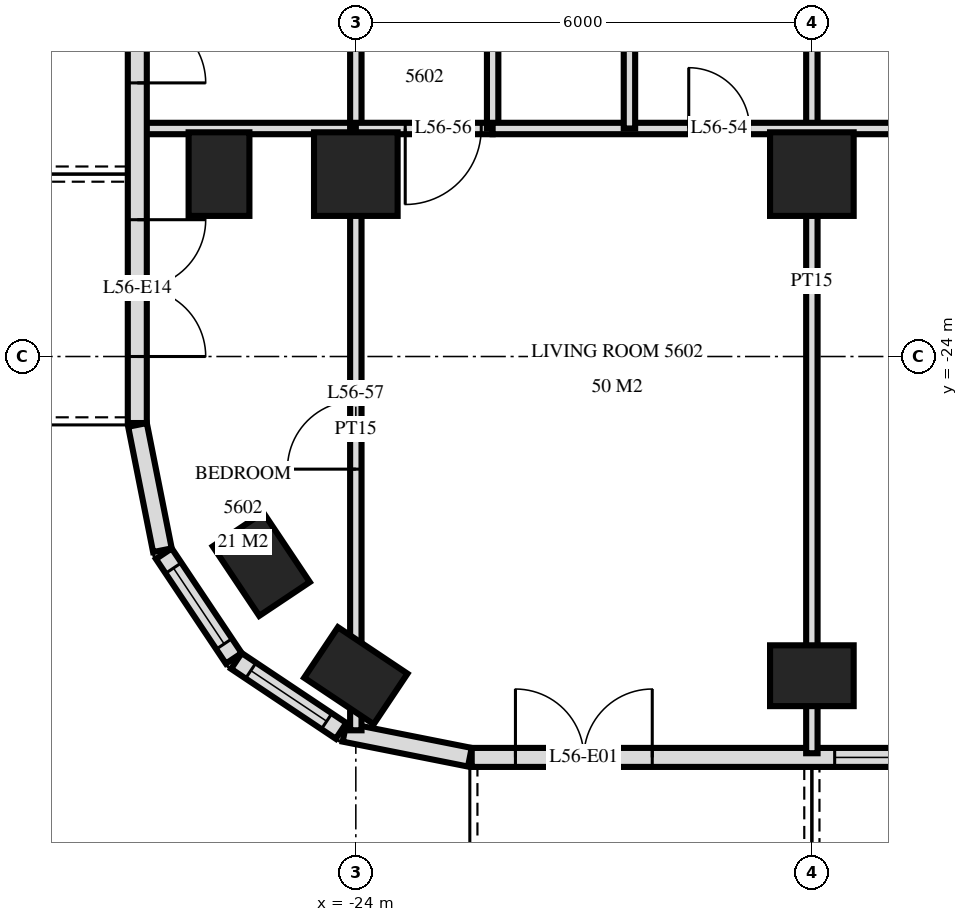
"""IFC4 building model, lengths in metres.
Left out: names, types, materials, properties, quantities, classifications, styles, units other than length and angle.
Written with IfcOpenShell. Run it as: python <this file> out.ifc"""

import sys

from ifc_helpers import new_model, si_unit, direction, frame, frame_2d, origin, origin_2d, place, context, subcontext, project, spatial, rectangle, extrude, element, fill, save


model = new_model("IFC4")
c1 = context("Model", 3, precision=1e-05, world=origin(), true_north=direction((0.0, 1.0)))
c2 = subcontext(c1, "Body", "Model", "MODEL_VIEW")
j1 = project(units=[si_unit("LENGTHUNIT", "METRE"), si_unit("PLANEANGLEUNIT", "RADIAN")], contexts=[c1])
p1 = place(None, origin())
s1 = spatial("IfcSite", under=j1, at=p1, CompositionType="ELEMENT")
p2 = place(p1, origin())
s2 = spatial("IfcBuilding", under=s1, at=p2, CompositionType="ELEMENT")
p3 = place(p2, frame((0.0, 0.0, 215.1)))
s3 = spatial("IfcBuildingStorey", under=s2, at=p3, CompositionType="ELEMENT", Elevation=215.1)
for number, where, z_axis, x_axis in (
    (1, (-25.8, -21.6, 0.0), (0.0, 0.0, 1.0), (0.0, 1.0, 0.0)),
    (2, (-25.244, -26.733, 0.0), (0.0, 0.0, 1.0), (-0.556, 0.831, 0.0)),
    (3, (-24.0, -28.2, 0.0), (0.0, 0.0, 1.0), (-0.831, 0.556, 0.0)),
):
    element("IfcColumn", number, at=place(p3, frame(where, z_axis=z_axis, x_axis=x_axis)), inside=s3, PredefinedType="COLUMN", context=c2, shape_type="SweptSolid", body=[
        extrude(rectangle(XDim=1.1, YDim=0.8, at=origin_2d()), origin(), (0.0, 0.0, 1.0), 3.5),
    ])
p4 = place(p3, frame((-24.0, -21.6, 0.0), z_axis=(0.0, 0.0, 1.0), x_axis=(1.0, 0.0, 0.0)))
e4 = element("IfcColumn", 4, at=p4, inside=s3, PredefinedType="COLUMN", context=c2, shape_type="SweptSolid", body=[
    extrude(rectangle(XDim=1.1, YDim=1.1, at=origin_2d()), origin(), (0.0, 0.0, 1.0), 3.5),
])
p5 = place(p3, frame((-18.0, -28.2, 0.0), z_axis=(0.0, 0.0, 1.0), x_axis=(1.0, 0.0, 0.0)))
e5 = element("IfcColumn", 5, at=p5, inside=s3, PredefinedType="COLUMN", context=c2, shape_type="SweptSolid", body=[
    extrude(rectangle(XDim=1.1, YDim=0.8, at=origin_2d()), origin(), (0.0, 0.0, 1.0), 3.5),
])
p6 = place(p3, frame((-18.0, -21.6, 0.0), z_axis=(0.0, 0.0, 1.0), x_axis=(1.0, 0.0, 0.0)))
e6 = element("IfcColumn", 6, at=p6, inside=s3, PredefinedType="COLUMN", context=c2, shape_type="SweptSolid", body=[
    extrude(rectangle(XDim=1.1, YDim=1.1, at=origin_2d()), origin(), (0.0, 0.0, 1.0), 3.5),
])
p7 = place(p3, frame((-26.875, -3.325, 0.0), z_axis=(0.0, 0.0, 1.0), x_axis=(0.0, -1.0, 0.0)))
e7 = element("IfcWall", 7, at=p7, inside=s3, PredefinedType="SOLIDWALL", context=c2, shape_type="SweptSolid", body=[
    extrude(rectangle(XDim=21.551, YDim=0.25, at=frame_2d((10.775, 0.0))), origin(), (0.0, 0.0, 1.0), 3.22),
])
p8 = place(p7, frame((7.275, 0.0, 0.0)))
e8 = element("IfcOpeningElement", 8, at=p8, cuts=e7, PredefinedType="OPENING", context=c2, shape_type="SweptSolid", body=[
    extrude(rectangle(XDim=1.8, YDim=2.4, at=frame_2d((0.9, 1.2))), frame((0.0, 0.135, 0.0), z_axis=(0.0, -1.0, 0.0), x_axis=(1.0, 0.0, 0.0)), (0.0, 0.0, 1.0), 0.27),
])
p9 = place(p7, frame((15.275, 0.0, 0.0)))
e9 = element("IfcOpeningElement", 9, at=p9, cuts=e7, PredefinedType="OPENING", context=c2, shape_type="SweptSolid", body=[
    extrude(rectangle(XDim=1.8, YDim=2.4, at=frame_2d((0.9, 1.2))), frame((0.0, 0.135, 0.0), z_axis=(0.0, -1.0, 0.0), x_axis=(1.0, 0.0, 0.0)), (0.0, 0.0, 1.0), 0.27),
])
p10 = place(p7, frame((18.875, 0.0, 0.0)))
e10 = element("IfcOpeningElement", 10, at=p10, cuts=e7, PredefinedType="OPENING", context=c2, shape_type="SweptSolid", body=[
    extrude(rectangle(XDim=1.8, YDim=2.4, at=frame_2d((0.9, 1.2))), frame((0.0, 0.135, 0.0), z_axis=(0.0, -1.0, 0.0), x_axis=(1.0, 0.0, 0.0)), (0.0, 0.0, 1.0), 0.27),
])
p11 = place(p3, frame((-26.873, -24.9, 0.0), z_axis=(0.0, 0.0, 1.0), x_axis=(0.195026884138, -0.980797896849, 0.0)))
e11 = element("IfcWall", 11, at=p11, inside=s3, PredefinedType="SOLIDWALL", context=c2, shape_type="SweptSolid", body=[
    extrude(rectangle(XDim=1.681, YDim=0.25, at=frame_2d((0.841, 0.0))), origin(), (0.0, 0.0, 1.0), 3.22),
])
p12 = place(p3, frame((-26.526, -26.594, 0.0), z_axis=(0.0, 0.0, 1.0), x_axis=(0.55555029066, -0.831482937015, 0.0)))
e12 = element("IfcWall", 12, at=p12, inside=s3, PredefinedType="SOLIDWALL", context=c2, shape_type="SweptSolid", body=[
    extrude(rectangle(XDim=1.656, YDim=0.25, at=frame_2d((0.828, 0.0))), origin(), (0.0, 0.0, 1.0), 3.22),
])
p13 = place(p12, frame((0.228, 0.0, 0.9)))
e13 = element("IfcOpeningElement", 13, at=p13, cuts=e12, PredefinedType="OPENING", context=c2, shape_type="SweptSolid", body=[
    extrude(rectangle(XDim=1.2, YDim=1.5, at=frame_2d((0.6, 0.75))), frame((0.0, 0.135, 0.0), z_axis=(0.0, -1.0, 0.0), x_axis=(1.0, 0.0, 0.0)), (0.0, 0.0, 1.0), 0.27),
])
p14 = place(p3, frame((-25.571, -28.006, 0.0), z_axis=(0.0, 0.0, 1.0), x_axis=(0.831482937015, -0.55555029066, 0.0)))
e14 = element("IfcWall", 14, at=p14, inside=s3, PredefinedType="SOLIDWALL", context=c2, shape_type="SweptSolid", body=[
    extrude(rectangle(XDim=1.656, YDim=0.25, at=frame_2d((0.828, 0.0))), origin(), (0.0, 0.0, 1.0), 3.22),
])
p15 = place(p14, frame((0.228, 0.0, 0.9)))
e15 = element("IfcOpeningElement", 15, at=p15, cuts=e14, PredefinedType="OPENING", context=c2, shape_type="SweptSolid", body=[
    extrude(rectangle(XDim=1.2, YDim=1.5, at=frame_2d((0.6, 0.75))), frame((0.0, 0.135, 0.0), z_axis=(0.0, -1.0, 0.0), x_axis=(1.0, 0.0, 0.0)), (0.0, 0.0, 1.0), 0.27),
])
p16 = place(p3, frame((-24.149, -28.945, 0.0), z_axis=(0.0, 0.0, 1.0), x_axis=(0.980775640221, -0.19513878023, 0.0)))
e16 = element("IfcWall", 16, at=p16, inside=s3, PredefinedType="SOLIDWALL", context=c2, shape_type="SweptSolid", body=[
    extrude(rectangle(XDim=1.681, YDim=0.25, at=frame_2d((0.841, 0.0))), origin(), (0.0, 0.0, 1.0), 3.22),
])
p17 = place(p3, frame((-22.475, -29.275, 0.0), z_axis=(0.0, 0.0, 1.0), x_axis=(1.0, 0.0, 0.0)))
e17 = element("IfcWall", 17, at=p17, inside=s3, PredefinedType="SOLIDWALL", context=c2, shape_type="SweptSolid", body=[
    extrude(rectangle(XDim=44.951, YDim=0.25, at=frame_2d((22.475, 0.0))), origin(), (0.0, 0.0, 1.0), 3.22),
])
p18 = place(p17, frame((0.575, 0.0, 0.0)))
e18 = element("IfcOpeningElement", 18, at=p18, cuts=e17, PredefinedType="OPENING", context=c2, shape_type="SweptSolid", body=[
    extrude(rectangle(XDim=1.8, YDim=2.4, at=frame_2d((0.9, 1.2))), frame((0.0, 0.135, 0.0), z_axis=(0.0, -1.0, 0.0), x_axis=(1.0, 0.0, 0.0)), (0.0, 0.0, 1.0), 0.27),
])
p19 = place(p17, frame((4.775, 0.0, 0.9)))
e19 = element("IfcOpeningElement", 19, at=p19, cuts=e17, PredefinedType="OPENING", context=c2, shape_type="SweptSolid", body=[
    extrude(rectangle(XDim=2.4, YDim=1.5, at=frame_2d((1.2, 0.75))), frame((0.0, 0.135, 0.0), z_axis=(0.0, -1.0, 0.0), x_axis=(1.0, 0.0, 0.0)), (0.0, 0.0, 1.0), 0.27),
])
p20 = place(p17, frame((8.075, 0.0, 0.0)))
e20 = element("IfcOpeningElement", 20, at=p20, cuts=e17, PredefinedType="OPENING", context=c2, shape_type="SweptSolid", body=[
    extrude(rectangle(XDim=1.8, YDim=2.4, at=frame_2d((0.9, 1.2))), frame((0.0, 0.135, 0.0), z_axis=(0.0, -1.0, 0.0), x_axis=(1.0, 0.0, 0.0)), (0.0, 0.0, 1.0), 0.27),
])
p21 = place(p17, frame((11.075, 0.0, 0.0)))
e21 = element("IfcOpeningElement", 21, at=p21, cuts=e17, PredefinedType="OPENING", context=c2, shape_type="SweptSolid", body=[
    extrude(rectangle(XDim=1.8, YDim=2.4, at=frame_2d((0.9, 1.2))), frame((0.0, 0.135, 0.0), z_axis=(0.0, -1.0, 0.0), x_axis=(1.0, 0.0, 0.0)), (0.0, 0.0, 1.0), 0.27),
])
p22 = place(p17, frame((13.775, 0.0, 0.9)))
e22 = element("IfcOpeningElement", 22, at=p22, cuts=e17, PredefinedType="OPENING", context=c2, shape_type="SweptSolid", body=[
    extrude(rectangle(XDim=2.4, YDim=1.5, at=frame_2d((1.2, 0.75))), frame((0.0, 0.135, 0.0), z_axis=(0.0, -1.0, 0.0), x_axis=(1.0, 0.0, 0.0)), (0.0, 0.0, 1.0), 0.27),
])
p23 = place(p17, frame((16.775, 0.0, 0.9)))
e23 = element("IfcOpeningElement", 23, at=p23, cuts=e17, PredefinedType="OPENING", context=c2, shape_type="SweptSolid", body=[
    extrude(rectangle(XDim=2.4, YDim=1.5, at=frame_2d((1.2, 0.75))), frame((0.0, 0.135, 0.0), z_axis=(0.0, -1.0, 0.0), x_axis=(1.0, 0.0, 0.0)), (0.0, 0.0, 1.0), 0.27),
])
p24 = place(p17, frame((20.075, 0.0, 0.0)))
e24 = element("IfcOpeningElement", 24, at=p24, cuts=e17, PredefinedType="OPENING", context=c2, shape_type="SweptSolid", body=[
    extrude(rectangle(XDim=1.8, YDim=2.4, at=frame_2d((0.9, 1.2))), frame((0.0, 0.135, 0.0), z_axis=(0.0, -1.0, 0.0), x_axis=(1.0, 0.0, 0.0)), (0.0, 0.0, 1.0), 0.27),
])
p25 = place(p17, frame((23.075, 0.0, 0.0)))
e25 = element("IfcOpeningElement", 25, at=p25, cuts=e17, PredefinedType="OPENING", context=c2, shape_type="SweptSolid", body=[
    extrude(rectangle(XDim=1.8, YDim=2.4, at=frame_2d((0.9, 1.2))), frame((0.0, 0.135, 0.0), z_axis=(0.0, -1.0, 0.0), x_axis=(1.0, 0.0, 0.0)), (0.0, 0.0, 1.0), 0.27),
])
p26 = place(p17, frame((25.775, 0.0, 0.9)))
e26 = element("IfcOpeningElement", 26, at=p26, cuts=e17, PredefinedType="OPENING", context=c2, shape_type="SweptSolid", body=[
    extrude(rectangle(XDim=2.4, YDim=1.5, at=frame_2d((1.2, 0.75))), frame((0.0, 0.135, 0.0), z_axis=(0.0, -1.0, 0.0), x_axis=(1.0, 0.0, 0.0)), (0.0, 0.0, 1.0), 0.27),
])
p27 = place(p17, frame((29.075, 0.0, 0.0)))
e27 = element("IfcOpeningElement", 27, at=p27, cuts=e17, PredefinedType="OPENING", context=c2, shape_type="SweptSolid", body=[
    extrude(rectangle(XDim=1.8, YDim=2.4, at=frame_2d((0.9, 1.2))), frame((0.0, 0.135, 0.0), z_axis=(0.0, -1.0, 0.0), x_axis=(1.0, 0.0, 0.0)), (0.0, 0.0, 1.0), 0.27),
])
p28 = place(p17, frame((31.775, 0.0, 0.9)))
e28 = element("IfcOpeningElement", 28, at=p28, cuts=e17, PredefinedType="OPENING", context=c2, shape_type="SweptSolid", body=[
    extrude(rectangle(XDim=2.4, YDim=1.5, at=frame_2d((1.2, 0.75))), frame((0.0, 0.135, 0.0), z_axis=(0.0, -1.0, 0.0), x_axis=(1.0, 0.0, 0.0)), (0.0, 0.0, 1.0), 0.27),
])
p29 = place(p17, frame((35.075, 0.0, 0.0)))
e29 = element("IfcOpeningElement", 29, at=p29, cuts=e17, PredefinedType="OPENING", context=c2, shape_type="SweptSolid", body=[
    extrude(rectangle(XDim=1.8, YDim=2.4, at=frame_2d((0.9, 1.2))), frame((0.0, 0.135, 0.0), z_axis=(0.0, -1.0, 0.0), x_axis=(1.0, 0.0, 0.0)), (0.0, 0.0, 1.0), 0.27),
])
p30 = place(p17, frame((41.075, 0.0, 0.0)))
e30 = element("IfcOpeningElement", 30, at=p30, cuts=e17, PredefinedType="OPENING", context=c2, shape_type="SweptSolid", body=[
    extrude(rectangle(XDim=1.8, YDim=2.4, at=frame_2d((0.9, 1.2))), frame((0.0, 0.135, 0.0), z_axis=(0.0, -1.0, 0.0), x_axis=(1.0, 0.0, 0.0)), (0.0, 0.0, 1.0), 0.27),
])
p31 = place(p3, frame((-18.0, -29.22, 0.0), z_axis=(0.0, 0.0, 1.0), x_axis=(0.0, 1.0, 0.0)))
e31 = element("IfcWall", 31, at=p31, inside=s3, PredefinedType="PARTITIONING", context=c2, shape_type="SweptSolid", body=[
    extrude(rectangle(XDim=12.42, YDim=0.15, at=frame_2d((6.21, 0.0))), origin(), (0.0, 0.0, 1.0), 3.22),
])
for number, where, z_axis, x_axis in (
    (32, (-20.4, -21.0, 0.0), (0.0, 0.0, 1.0), (0.0, 1.0, 0.0)),
    (33, (-22.2, -21.0, 0.0), (0.0, 0.0, 1.0), (0.0, 1.0, 0.0)),
):
    element("IfcWall", number, at=place(p3, frame(where, z_axis=z_axis, x_axis=x_axis)), inside=s3, PredefinedType="PARTITIONING", context=c2, shape_type="SweptSolid", body=[
        extrude(rectangle(XDim=4.2, YDim=0.15, at=frame_2d((2.1, 0.0))), origin(), (0.0, 0.0, 1.0), 3.22),
    ])
p32 = place(p3, frame((-24.0, -21.0, 0.0), z_axis=(0.0, 0.0, 1.0), x_axis=(0.0, 1.0, 0.0)))
e34 = element("IfcWall", 34, at=p32, inside=s3, PredefinedType="PARTITIONING", context=c2, shape_type="SweptSolid", body=[
    extrude(rectangle(XDim=4.2, YDim=0.15, at=frame_2d((2.1, 0.0))), origin(), (0.0, 0.0, 1.0), 3.22),
])
p33 = place(p32, frame((1.58, 0.0, 0.0)))
e35 = element("IfcOpeningElement", 35, at=p33, cuts=e34, PredefinedType="OPENING", context=c2, shape_type="SweptSolid", body=[
    extrude(rectangle(XDim=1.0, YDim=2.1, at=frame_2d((0.5, 1.05))), frame((0.0, 0.085, 0.0), z_axis=(0.0, -1.0, 0.0), x_axis=(1.0, 0.0, 0.0)), (0.0, 0.0, 1.0), 0.17),
])
p34 = place(p3, frame((-24.0, -28.918, 0.0), z_axis=(0.0, 0.0, 1.0), x_axis=(0.0, 1.0, 0.0)))
e36 = element("IfcWall", 36, at=p34, inside=s3, PredefinedType="PARTITIONING", context=c2, shape_type="SweptSolid", body=[
    extrude(rectangle(XDim=7.918, YDim=0.15, at=frame_2d((3.959, 0.0))), origin(), (0.0, 0.0, 1.0), 3.22),
])
p35 = place(p34, frame((3.436, 0.0, 0.0)))
e37 = element("IfcOpeningElement", 37, at=p35, cuts=e36, PredefinedType="OPENING", context=c2, shape_type="SweptSolid", body=[
    extrude(rectangle(XDim=0.9, YDim=2.1, at=frame_2d((0.45, 1.05))), frame((0.0, 0.085, 0.0), z_axis=(0.0, -1.0, 0.0), x_axis=(1.0, 0.0, 0.0)), (0.0, 0.0, 1.0), 0.17),
])
p36 = place(p3, frame((-24.0, -21.0, 0.0), z_axis=(0.0, 0.0, 1.0), x_axis=(1.0, 0.0, 0.0)))
e38 = element("IfcWall", 38, at=p36, inside=s3, PredefinedType="PARTITIONING", context=c2, shape_type="SweptSolid", body=[
    extrude(rectangle(XDim=1.8, YDim=0.15, at=frame_2d((0.9, 0.0))), origin(), (0.0, 0.0, 1.0), 3.22),
])
p37 = place(p36, frame((0.65, 0.0, 0.0)))
e39 = element("IfcOpeningElement", 39, at=p37, cuts=e38, PredefinedType="OPENING", context=c2, shape_type="SweptSolid", body=[
    extrude(rectangle(XDim=1.0, YDim=2.1, at=frame_2d((0.5, 1.05))), frame((0.0, 0.085, 0.0), z_axis=(0.0, -1.0, 0.0), x_axis=(1.0, 0.0, 0.0)), (0.0, 0.0, 1.0), 0.17),
])
p38 = place(p3, frame((-26.82, -21.0, 0.0), z_axis=(0.0, 0.0, 1.0), x_axis=(1.0, 0.0, 0.0)))
e40 = element("IfcWall", 40, at=p38, inside=s3, PredefinedType="PARTITIONING", context=c2, shape_type="SweptSolid", body=[
    extrude(rectangle(XDim=2.82, YDim=0.15, at=frame_2d((1.41, 0.0))), origin(), (0.0, 0.0, 1.0), 3.22),
])
p39 = place(p3, frame((-22.2, -21.0, 0.0), z_axis=(0.0, 0.0, 1.0), x_axis=(1.0, 0.0, 0.0)))
e41 = element("IfcWall", 41, at=p39, inside=s3, PredefinedType="PARTITIONING", context=c2, shape_type="SweptSolid", body=[
    extrude(rectangle(XDim=6.3, YDim=0.15, at=frame_2d((3.15, 0.0))), origin(), (0.0, 0.0, 1.0), 3.22),
])
p40 = place(p39, frame((2.58, 0.0, 0.0)))
e42 = element("IfcOpeningElement", 42, at=p40, cuts=e41, PredefinedType="OPENING", context=c2, shape_type="SweptSolid", body=[
    extrude(rectangle(XDim=0.8, YDim=2.1, at=frame_2d((0.4, 1.05))), frame((0.0, 0.085, 0.0), z_axis=(0.0, -1.0, 0.0), x_axis=(1.0, 0.0, 0.0)), (0.0, 0.0, 1.0), 0.17),
])
p41 = place(p13, origin())
e43 = element("IfcWindow", 43, at=p41, inside=s3, PartitioningType="SINGLE_PANEL", PredefinedType="WINDOW", context=c2, shape_type="SweptSolid", body=[
    extrude(rectangle(XDim=1.2, YDim=1.5, at=frame_2d((0.6, 0.75))), frame((0.0, 0.03, 0.0), z_axis=(0.0, -1.0, 0.0), x_axis=(1.0, 0.0, 0.0)), (0.0, 0.0, 1.0), 0.06),
])
fill(e13, e43)
p42 = place(p15, origin())
e44 = element("IfcWindow", 44, at=p42, inside=s3, PartitioningType="SINGLE_PANEL", PredefinedType="WINDOW", context=c2, shape_type="SweptSolid", body=[
    extrude(rectangle(XDim=1.2, YDim=1.5, at=frame_2d((0.6, 0.75))), frame((0.0, 0.03, 0.0), z_axis=(0.0, -1.0, 0.0), x_axis=(1.0, 0.0, 0.0)), (0.0, 0.0, 1.0), 0.06),
])
fill(e15, e44)
p43 = place(p18, origin())
e45 = element("IfcDoor", 45, at=p43, inside=s3, OperationType="DOUBLE_DOOR_SINGLE_SWING", PredefinedType="DOOR", context=c2, shape_type="SweptSolid", body=[
    extrude(rectangle(XDim=1.8, YDim=2.4, at=frame_2d((0.9, 1.2))), frame((0.0, 0.025, 0.0), z_axis=(0.0, -1.0, 0.0), x_axis=(1.0, 0.0, 0.0)), (0.0, 0.0, 1.0), 0.05),
])
fill(e18, e45)
p44 = place(p19, origin())
e46 = element("IfcWindow", 46, at=p44, inside=s3, PartitioningType="SINGLE_PANEL", PredefinedType="WINDOW", context=c2, shape_type="SweptSolid", body=[
    extrude(rectangle(XDim=2.4, YDim=1.5, at=frame_2d((1.2, 0.75))), frame((0.0, 0.03, 0.0), z_axis=(0.0, -1.0, 0.0), x_axis=(1.0, 0.0, 0.0)), (0.0, 0.0, 1.0), 0.06),
])
fill(e19, e46)
p45 = place(p9, origin())
e47 = element("IfcDoor", 47, at=p45, inside=s3, OperationType="DOUBLE_DOOR_SINGLE_SWING", PredefinedType="DOOR", context=c2, shape_type="SweptSolid", body=[
    extrude(rectangle(XDim=1.8, YDim=2.4, at=frame_2d((0.9, 1.2))), frame((0.0, 0.025, 0.0), z_axis=(0.0, -1.0, 0.0), x_axis=(1.0, 0.0, 0.0)), (0.0, 0.0, 1.0), 0.05),
])
fill(e9, e47)
p46 = place(p10, origin())
e48 = element("IfcDoor", 48, at=p46, inside=s3, OperationType="DOUBLE_DOOR_SINGLE_SWING", PredefinedType="DOOR", context=c2, shape_type="SweptSolid", body=[
    extrude(rectangle(XDim=1.8, YDim=2.4, at=frame_2d((0.9, 1.2))), frame((0.0, 0.025, 0.0), z_axis=(0.0, -1.0, 0.0), x_axis=(1.0, 0.0, 0.0)), (0.0, 0.0, 1.0), 0.05),
])
fill(e10, e48)
p47 = place(p40, origin())
e49 = element("IfcDoor", 49, at=p47, inside=s3, OperationType="SINGLE_SWING_RIGHT", PredefinedType="DOOR", context=c2, shape_type="SweptSolid", body=[
    extrude(rectangle(XDim=0.8, YDim=2.1, at=frame_2d((0.4, 1.05))), frame((0.0, 0.025, 0.0), z_axis=(0.0, -1.0, 0.0), x_axis=(1.0, 0.0, 0.0)), (0.0, 0.0, 1.0), 0.05),
])
fill(e42, e49)
p48 = place(p37, frame((0.5, 0.0, 0.0), z_axis=(0.0, 0.0, 1.0), x_axis=(-1.0, 0.0, 0.0)))
e50 = element("IfcDoor", 50, at=p48, inside=s3, OperationType="SINGLE_SWING_LEFT", PredefinedType="DOOR", context=c2, shape_type="SweptSolid", body=[
    extrude(rectangle(XDim=1.0, YDim=2.1, at=frame_2d((0.0, 1.05))), frame((0.0, -0.025, 0.0), z_axis=(0.0, 1.0, 0.0), x_axis=(-1.0, 0.0, 0.0)), (0.0, 0.0, 1.0), 0.05),
])
fill(e39, e50)
p49 = place(p35, origin())
e51 = element("IfcDoor", 51, at=p49, inside=s3, OperationType="SINGLE_SWING_RIGHT", PredefinedType="DOOR", context=c2, shape_type="SweptSolid", body=[
    extrude(rectangle(XDim=0.9, YDim=2.1, at=frame_2d((0.45, 1.05))), frame((0.0, 0.025, 0.0), z_axis=(0.0, -1.0, 0.0), x_axis=(1.0, 0.0, 0.0)), (0.0, 0.0, 1.0), 0.05),
])
fill(e37, e51)
save(model, sys.argv[1])
